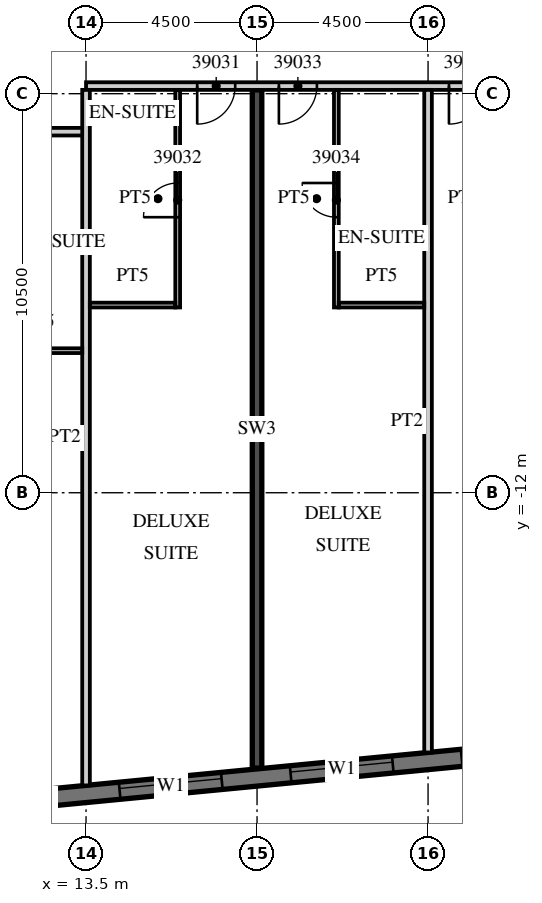
"""IFC4 building model, lengths in metres.
Left out: names, types, materials, properties, quantities, classifications, styles, units other than length and angle.
Written with IfcOpenShell. Run it as: python <this file> out.ifc"""

import sys

from ifc_helpers import new_model, si_unit, direction, frame, frame_2d, origin, place, context, subcontext, project, spatial, rectangle, extrude, element, fill, save


model = new_model("IFC4")
c1 = context("Model", 3, precision=1e-05, world=origin(), true_north=direction((0.0, 1.0)))
c2 = subcontext(c1, "Body", "Model", "MODEL_VIEW")
j1 = project(units=[si_unit("LENGTHUNIT", "METRE"), si_unit("PLANEANGLEUNIT", "RADIAN")], contexts=[c1])
p1 = place(None, origin())
s1 = spatial("IfcSite", under=j1, at=p1, CompositionType="ELEMENT")
p2 = place(p1, origin())
s2 = spatial("IfcBuilding", under=s1, at=p2, CompositionType="ELEMENT")
p3 = place(p2, frame((0.0, 0.0, 170.2)))
s3 = spatial("IfcBuildingStorey", under=s2, at=p3, CompositionType="ELEMENT", Elevation=170.2)
p4 = place(p3, frame((18.0, -19.245, 0.0), z_axis=(0.0, 0.0, 1.0), x_axis=(0.0, 1.0, 0.0)))
e1 = element("IfcWall", 1, at=p4, inside=s3, PredefinedType="SHEAR", context=c2, shape_type="SweptSolid", body=[
    extrude(rectangle(XDim=17.845, YDim=0.25, at=frame_2d((8.923, 0.0))), origin(), (0.0, 0.0, 1.0), 3.3),
])
p5 = place(p3, frame((-13.521, -22.529, 0.0), z_axis=(0.0, 0.0, 1.0), x_axis=(0.995396436651, 0.095843277819, 0.0)))
e2 = element("IfcWall", 2, at=p5, inside=s3, PredefinedType="SOLIDWALL", context=c2, shape_type="SweptSolid", body=[
    extrude(rectangle(XDim=51.578, YDim=0.45, at=frame_2d((25.789, 0.0))), origin(), (0.0, 0.0, 1.0), 3.02),
])
p6 = place(p5, frame((0.91, 0.0, 0.45)))
e3 = element("IfcOpeningElement", 3, at=p6, cuts=e2, PredefinedType="OPENING", context=c2, shape_type="SweptSolid", body=[
    extrude(rectangle(XDim=2.7, YDim=2.25, at=frame_2d((1.35, 1.125))), frame((0.0, 0.235, 0.0), z_axis=(0.0, -1.0, 0.0), x_axis=(1.0, 0.0, 0.0)), (0.0, 0.0, 1.0), 0.47),
])
p7 = place(p5, frame((5.431, 0.0, 0.45)))
e4 = element("IfcOpeningElement", 4, at=p7, cuts=e2, PredefinedType="OPENING", context=c2, shape_type="SweptSolid", body=[
    extrude(rectangle(XDim=2.7, YDim=2.25, at=frame_2d((1.35, 1.125))), frame((0.0, 0.235, 0.0), z_axis=(0.0, -1.0, 0.0), x_axis=(1.0, 0.0, 0.0)), (0.0, 0.0, 1.0), 0.47),
])
p8 = place(p5, frame((9.952, 0.0, 0.45)))
e5 = element("IfcOpeningElement", 5, at=p8, cuts=e2, PredefinedType="OPENING", context=c2, shape_type="SweptSolid", body=[
    extrude(rectangle(XDim=2.7, YDim=2.25, at=frame_2d((1.35, 1.125))), frame((0.0, 0.235, 0.0), z_axis=(0.0, -1.0, 0.0), x_axis=(1.0, 0.0, 0.0)), (0.0, 0.0, 1.0), 0.47),
])
p9 = place(p5, frame((14.473, 0.0, 0.45)))
e6 = element("IfcOpeningElement", 6, at=p9, cuts=e2, PredefinedType="OPENING", context=c2, shape_type="SweptSolid", body=[
    extrude(rectangle(XDim=2.7, YDim=2.25, at=frame_2d((1.35, 1.125))), frame((0.0, 0.235, 0.0), z_axis=(0.0, -1.0, 0.0), x_axis=(1.0, 0.0, 0.0)), (0.0, 0.0, 1.0), 0.47),
])
p10 = place(p5, frame((18.994, 0.0, 0.45)))
e7 = element("IfcOpeningElement", 7, at=p10, cuts=e2, PredefinedType="OPENING", context=c2, shape_type="SweptSolid", body=[
    extrude(rectangle(XDim=2.7, YDim=2.25, at=frame_2d((1.35, 1.125))), frame((0.0, 0.235, 0.0), z_axis=(0.0, -1.0, 0.0), x_axis=(1.0, 0.0, 0.0)), (0.0, 0.0, 1.0), 0.47),
])
p11 = place(p5, frame((23.514, 0.0, 0.45)))
e8 = element("IfcOpeningElement", 8, at=p11, cuts=e2, PredefinedType="OPENING", context=c2, shape_type="SweptSolid", body=[
    extrude(rectangle(XDim=2.7, YDim=2.25, at=frame_2d((1.35, 1.125))), frame((0.0, 0.235, 0.0), z_axis=(0.0, -1.0, 0.0), x_axis=(1.0, 0.0, 0.0)), (0.0, 0.0, 1.0), 0.47),
])
p12 = place(p5, frame((28.035, 0.0, 0.45)))
e9 = element("IfcOpeningElement", 9, at=p12, cuts=e2, PredefinedType="OPENING", context=c2, shape_type="SweptSolid", body=[
    extrude(rectangle(XDim=2.7, YDim=2.25, at=frame_2d((1.35, 1.125))), frame((0.0, 0.235, 0.0), z_axis=(0.0, -1.0, 0.0), x_axis=(1.0, 0.0, 0.0)), (0.0, 0.0, 1.0), 0.47),
])
p13 = place(p5, frame((32.556, 0.0, 0.45)))
e10 = element("IfcOpeningElement", 10, at=p13, cuts=e2, PredefinedType="OPENING", context=c2, shape_type="SweptSolid", body=[
    extrude(rectangle(XDim=2.7, YDim=2.25, at=frame_2d((1.35, 1.125))), frame((0.0, 0.235, 0.0), z_axis=(0.0, -1.0, 0.0), x_axis=(1.0, 0.0, 0.0)), (0.0, 0.0, 1.0), 0.47),
])
p14 = place(p5, frame((37.077, 0.0, 0.45)))
e11 = element("IfcOpeningElement", 11, at=p14, cuts=e2, PredefinedType="OPENING", context=c2, shape_type="SweptSolid", body=[
    extrude(rectangle(XDim=2.7, YDim=2.25, at=frame_2d((1.35, 1.125))), frame((0.0, 0.235, 0.0), z_axis=(0.0, -1.0, 0.0), x_axis=(1.0, 0.0, 0.0)), (0.0, 0.0, 1.0), 0.47),
])
p15 = place(p5, frame((41.598, 0.0, 0.45)))
e12 = element("IfcOpeningElement", 12, at=p15, cuts=e2, PredefinedType="OPENING", context=c2, shape_type="SweptSolid", body=[
    extrude(rectangle(XDim=2.7, YDim=2.25, at=frame_2d((1.35, 1.125))), frame((0.0, 0.235, 0.0), z_axis=(0.0, -1.0, 0.0), x_axis=(1.0, 0.0, 0.0)), (0.0, 0.0, 1.0), 0.47),
])
p16 = place(p5, frame((46.119, 0.0, 0.45)))
e13 = element("IfcOpeningElement", 13, at=p16, cuts=e2, PredefinedType="OPENING", context=c2, shape_type="SweptSolid", body=[
    extrude(rectangle(XDim=2.7, YDim=2.25, at=frame_2d((1.35, 1.125))), frame((0.0, 0.235, 0.0), z_axis=(0.0, -1.0, 0.0), x_axis=(1.0, 0.0, 0.0)), (0.0, 0.0, 1.0), 0.47),
])
p17 = place(p3, frame((-13.5, -2.5, 0.0), z_axis=(0.0, 0.0, 1.0), x_axis=(1.0, 0.0, 0.0)))
e14 = element("IfcWall", 14, at=p17, inside=s3, PredefinedType="PARTITIONING", context=c2, shape_type="SweptSolid", body=[
    extrude(rectangle(XDim=27.0, YDim=0.2, at=frame_2d((13.5, 0.0))), origin(), (0.0, 0.0, 1.0), 3.02),
])
p18 = place(p17, frame((0.575, 0.0, 0.0)))
e15 = element("IfcOpeningElement", 15, at=p18, cuts=e14, PredefinedType="OPENING", context=c2, shape_type="SweptSolid", body=[
    extrude(rectangle(XDim=1.0, YDim=2.1, at=frame_2d((0.5, 1.05))), frame((0.0, 0.11, 0.0), z_axis=(0.0, -1.0, 0.0), x_axis=(1.0, 0.0, 0.0)), (0.0, 0.0, 1.0), 0.22),
])
p19 = place(p17, frame((9.863, 0.0, 0.0)))
e16 = element("IfcOpeningElement", 16, at=p19, cuts=e14, PredefinedType="OPENING", context=c2, shape_type="SweptSolid", body=[
    extrude(rectangle(XDim=1.2, YDim=2.1, at=frame_2d((0.6, 1.05))), frame((0.0, 0.11, 0.0), z_axis=(0.0, -1.0, 0.0), x_axis=(1.0, 0.0, 0.0)), (0.0, 0.0, 1.0), 0.22),
])
p20 = place(p17, frame((15.938, 0.0, 0.0)))
e17 = element("IfcOpeningElement", 17, at=p20, cuts=e14, PredefinedType="OPENING", context=c2, shape_type="SweptSolid", body=[
    extrude(rectangle(XDim=1.2, YDim=2.1, at=frame_2d((0.6, 1.05))), frame((0.0, 0.11, 0.0), z_axis=(0.0, -1.0, 0.0), x_axis=(1.0, 0.0, 0.0)), (0.0, 0.0, 1.0), 0.22),
])
p21 = place(p17, frame((23.075, 0.0, 0.0)))
e18 = element("IfcOpeningElement", 18, at=p21, cuts=e14, PredefinedType="OPENING", context=c2, shape_type="SweptSolid", body=[
    extrude(rectangle(XDim=1.0, YDim=2.1, at=frame_2d((0.5, 1.05))), frame((0.0, 0.11, 0.0), z_axis=(0.0, -1.0, 0.0), x_axis=(1.0, 0.0, 0.0)), (0.0, 0.0, 1.0), 0.22),
])
p22 = place(p3, frame((13.5, -1.3, 0.0), z_axis=(0.0, 0.0, 1.0), x_axis=(1.0, 0.0, 0.0)))
e19 = element("IfcWall", 19, at=p22, inside=s3, PredefinedType="PARTITIONING", context=c2, shape_type="SweptSolid", body=[
    extrude(rectangle(XDim=26.317, YDim=0.2, at=frame_2d((13.158, 0.0))), origin(), (0.0, 0.0, 1.0), 3.02),
])
p23 = place(p22, frame((2.925, 0.0, 0.0)))
e20 = element("IfcOpeningElement", 20, at=p23, cuts=e19, PredefinedType="OPENING", context=c2, shape_type="SweptSolid", body=[
    extrude(rectangle(XDim=1.0, YDim=2.1, at=frame_2d((0.5, 1.05))), frame((0.0, 0.11, 0.0), z_axis=(0.0, -1.0, 0.0), x_axis=(1.0, 0.0, 0.0)), (0.0, 0.0, 1.0), 0.22),
])
p24 = place(p22, frame((5.075, 0.0, 0.0)))
e21 = element("IfcOpeningElement", 21, at=p24, cuts=e19, PredefinedType="OPENING", context=c2, shape_type="SweptSolid", body=[
    extrude(rectangle(XDim=1.0, YDim=2.1, at=frame_2d((0.5, 1.05))), frame((0.0, 0.11, 0.0), z_axis=(0.0, -1.0, 0.0), x_axis=(1.0, 0.0, 0.0)), (0.0, 0.0, 1.0), 0.22),
])
p25 = place(p22, frame((9.55, 0.0, 0.0)))
e22 = element("IfcOpeningElement", 22, at=p25, cuts=e19, PredefinedType="OPENING", context=c2, shape_type="SweptSolid", body=[
    extrude(rectangle(XDim=1.0, YDim=2.1, at=frame_2d((0.5, 1.05))), frame((0.0, 0.11, 0.0), z_axis=(0.0, -1.0, 0.0), x_axis=(1.0, 0.0, 0.0)), (0.0, 0.0, 1.0), 0.22),
])
p26 = place(p22, frame((18.862, 0.0, 0.0)))
e23 = element("IfcOpeningElement", 23, at=p26, cuts=e19, PredefinedType="OPENING", context=c2, shape_type="SweptSolid", body=[
    extrude(rectangle(XDim=1.2, YDim=2.1, at=frame_2d((0.6, 1.05))), frame((0.0, 0.11, 0.0), z_axis=(0.0, -1.0, 0.0), x_axis=(1.0, 0.0, 0.0)), (0.0, 0.0, 1.0), 0.22),
])
p27 = place(p22, frame((25.208, 0.0, 0.0)))
e24 = element("IfcOpeningElement", 24, at=p27, cuts=e19, PredefinedType="OPENING", context=c2, shape_type="SweptSolid", body=[
    extrude(rectangle(XDim=0.9, YDim=2.1, at=frame_2d((0.45, 1.05))), frame((0.0, 0.11, 0.0), z_axis=(0.0, -1.0, 0.0), x_axis=(1.0, 0.0, 0.0)), (0.0, 0.0, 1.0), 0.22),
])
p28 = place(p3, frame((13.5, -19.701, 0.0), z_axis=(0.0, 0.0, 1.0), x_axis=(0.0, 1.0, 0.0)))
e25 = element("IfcWall", 25, at=p28, inside=s3, PredefinedType="PARTITIONING", context=c2, shape_type="SweptSolid", body=[
    extrude(rectangle(XDim=18.301, YDim=0.2, at=frame_2d((9.15, 0.0))), origin(), (0.0, 0.0, 1.0), 3.02),
])
p29 = place(p3, frame((11.15, -8.262, 0.0), z_axis=(0.0, 0.0, 1.0), x_axis=(1.0, 0.0, 0.0)))
e26 = element("IfcWall", 26, at=p29, inside=s3, PredefinedType="PARTITIONING", context=c2, shape_type="SweptSolid", body=[
    extrude(rectangle(XDim=2.25, YDim=0.125, at=frame_2d((1.125, 0.0))), origin(), (0.0, 0.0, 1.0), 3.02),
])
p30 = place(p3, frame((15.912, -7.125, 0.0), z_axis=(0.0, 0.0, 1.0), x_axis=(0.0, 1.0, 0.0)))
e27 = element("IfcWall", 27, at=p30, inside=s3, PredefinedType="PARTITIONING", context=c2, shape_type="SweptSolid", body=[
    extrude(rectangle(XDim=5.725, YDim=0.125, at=frame_2d((2.863, 0.0))), origin(), (0.0, 0.0, 1.0), 3.02),
])
p31 = place(p30, frame((2.375, 0.0, 0.0)))
e28 = element("IfcOpeningElement", 28, at=p31, cuts=e27, PredefinedType="OPENING", context=c2, shape_type="SweptSolid", body=[
    extrude(rectangle(XDim=0.9, YDim=2.1, at=frame_2d((0.45, 1.05))), frame((0.0, 0.073, 0.0), z_axis=(0.0, -1.0, 0.0), x_axis=(1.0, 0.0, 0.0)), (0.0, 0.0, 1.0), 0.145),
])
p32 = place(p3, frame((13.6, -7.062, 0.0), z_axis=(0.0, 0.0, 1.0), x_axis=(1.0, 0.0, 0.0)))
e29 = element("IfcWall", 29, at=p32, inside=s3, PredefinedType="PARTITIONING", context=c2, shape_type="SweptSolid", body=[
    extrude(rectangle(XDim=2.25, YDim=0.125, at=frame_2d((1.125, 0.0))), origin(), (0.0, 0.0, 1.0), 3.02),
])
p33 = place(p3, frame((22.5, -18.834, 0.0), z_axis=(0.0, 0.0, 1.0), x_axis=(0.0, 1.0, 0.0)))
e30 = element("IfcWall", 30, at=p33, inside=s3, PredefinedType="PARTITIONING", context=c2, shape_type="SweptSolid", body=[
    extrude(rectangle(XDim=17.434, YDim=0.2, at=frame_2d((8.717, 0.0))), origin(), (0.0, 0.0, 1.0), 3.02),
])
p34 = place(p3, frame((20.087, -7.125, 0.0), z_axis=(0.0, 0.0, 1.0), x_axis=(0.0, 1.0, 0.0)))
e31 = element("IfcWall", 31, at=p34, inside=s3, PredefinedType="PARTITIONING", context=c2, shape_type="SweptSolid", body=[
    extrude(rectangle(XDim=5.725, YDim=0.125, at=frame_2d((2.863, 0.0))), origin(), (0.0, 0.0, 1.0), 3.02),
])
p35 = place(p34, frame((2.375, 0.0, 0.0)))
e32 = element("IfcOpeningElement", 32, at=p35, cuts=e31, PredefinedType="OPENING", context=c2, shape_type="SweptSolid", body=[
    extrude(rectangle(XDim=0.9, YDim=2.1, at=frame_2d((0.45, 1.05))), frame((0.0, 0.073, 0.0), z_axis=(0.0, -1.0, 0.0), x_axis=(1.0, 0.0, 0.0)), (0.0, 0.0, 1.0), 0.145),
])
p36 = place(p3, frame((20.15, -7.062, 0.0), z_axis=(0.0, 0.0, 1.0), x_axis=(1.0, 0.0, 0.0)))
e33 = element("IfcWall", 33, at=p36, inside=s3, PredefinedType="PARTITIONING", context=c2, shape_type="SweptSolid", body=[
    extrude(rectangle(XDim=2.25, YDim=0.125, at=frame_2d((1.125, 0.0))), origin(), (0.0, 0.0, 1.0), 3.02),
])
p37 = place(p12, origin())
e34 = element("IfcWindow", 34, at=p37, inside=s3, PartitioningType="SINGLE_PANEL", PredefinedType="WINDOW", context=c2, shape_type="SweptSolid", body=[
    extrude(rectangle(XDim=2.7, YDim=2.25, at=frame_2d((1.35, 1.125))), frame((0.0, 0.09, 0.0), z_axis=(0.0, -1.0, 0.0), x_axis=(1.0, 0.0, 0.0)), (0.0, 0.0, 1.0), 0.06),
])
fill(e9, e34)
p38 = place(p13, origin())
e35 = element("IfcWindow", 35, at=p38, inside=s3, PartitioningType="SINGLE_PANEL", PredefinedType="WINDOW", context=c2, shape_type="SweptSolid", body=[
    extrude(rectangle(XDim=2.7, YDim=2.25, at=frame_2d((1.35, 1.125))), frame((0.0, 0.09, 0.0), z_axis=(0.0, -1.0, 0.0), x_axis=(1.0, 0.0, 0.0)), (0.0, 0.0, 1.0), 0.06),
])
fill(e10, e35)
p39 = place(p14, origin())
e36 = element("IfcWindow", 36, at=p39, inside=s3, PartitioningType="SINGLE_PANEL", PredefinedType="WINDOW", context=c2, shape_type="SweptSolid", body=[
    extrude(rectangle(XDim=2.7, YDim=2.25, at=frame_2d((1.35, 1.125))), frame((0.0, 0.09, 0.0), z_axis=(0.0, -1.0, 0.0), x_axis=(1.0, 0.0, 0.0)), (0.0, 0.0, 1.0), 0.06),
])
fill(e11, e36)
p40 = place(p23, origin())
e37 = element("IfcDoor", 37, at=p40, inside=s3, OperationType="SINGLE_SWING_LEFT", PredefinedType="DOOR", context=c2, shape_type="SweptSolid", body=[
    extrude(rectangle(XDim=1.0, YDim=2.1, at=frame_2d((0.5, 1.05))), frame((0.0, 0.025, 0.0), z_axis=(0.0, -1.0, 0.0), x_axis=(1.0, 0.0, 0.0)), (0.0, 0.0, 1.0), 0.05),
])
fill(e20, e37)
p41 = place(p31, origin())
e38 = element("IfcDoor", 38, at=p41, inside=s3, OperationType="SINGLE_SWING_LEFT", PredefinedType="DOOR", context=c2, shape_type="SweptSolid", body=[
    extrude(rectangle(XDim=0.9, YDim=2.1, at=frame_2d((0.45, 1.05))), frame((0.0, 0.025, 0.0), z_axis=(0.0, -1.0, 0.0), x_axis=(1.0, 0.0, 0.0)), (0.0, 0.0, 1.0), 0.05),
])
fill(e28, e38)
p42 = place(p24, origin())
e39 = element("IfcDoor", 39, at=p42, inside=s3, OperationType="SINGLE_SWING_LEFT", PredefinedType="DOOR", context=c2, shape_type="SweptSolid", body=[
    extrude(rectangle(XDim=1.0, YDim=2.1, at=frame_2d((0.5, 1.05))), frame((0.0, 0.025, 0.0), z_axis=(0.0, -1.0, 0.0), x_axis=(1.0, 0.0, 0.0)), (0.0, 0.0, 1.0), 0.05),
])
fill(e21, e39)
p43 = place(p35, origin())
e40 = element("IfcDoor", 40, at=p43, inside=s3, OperationType="SINGLE_SWING_RIGHT", PredefinedType="DOOR", context=c2, shape_type="SweptSolid", body=[
    extrude(rectangle(XDim=0.9, YDim=2.1, at=frame_2d((0.45, 1.05))), frame((0.0, 0.025, 0.0), z_axis=(0.0, -1.0, 0.0), x_axis=(1.0, 0.0, 0.0)), (0.0, 0.0, 1.0), 0.05),
])
fill(e32, e40)
p44 = place(p25, origin())
e41 = element("IfcDoor", 41, at=p44, inside=s3, OperationType="SINGLE_SWING_LEFT", PredefinedType="DOOR", context=c2, shape_type="SweptSolid", body=[
    extrude(rectangle(XDim=1.0, YDim=2.1, at=frame_2d((0.5, 1.05))), frame((0.0, 0.025, 0.0), z_axis=(0.0, -1.0, 0.0), x_axis=(1.0, 0.0, 0.0)), (0.0, 0.0, 1.0), 0.05),
])
fill(e22, e41)
save(model, sys.argv[1])
